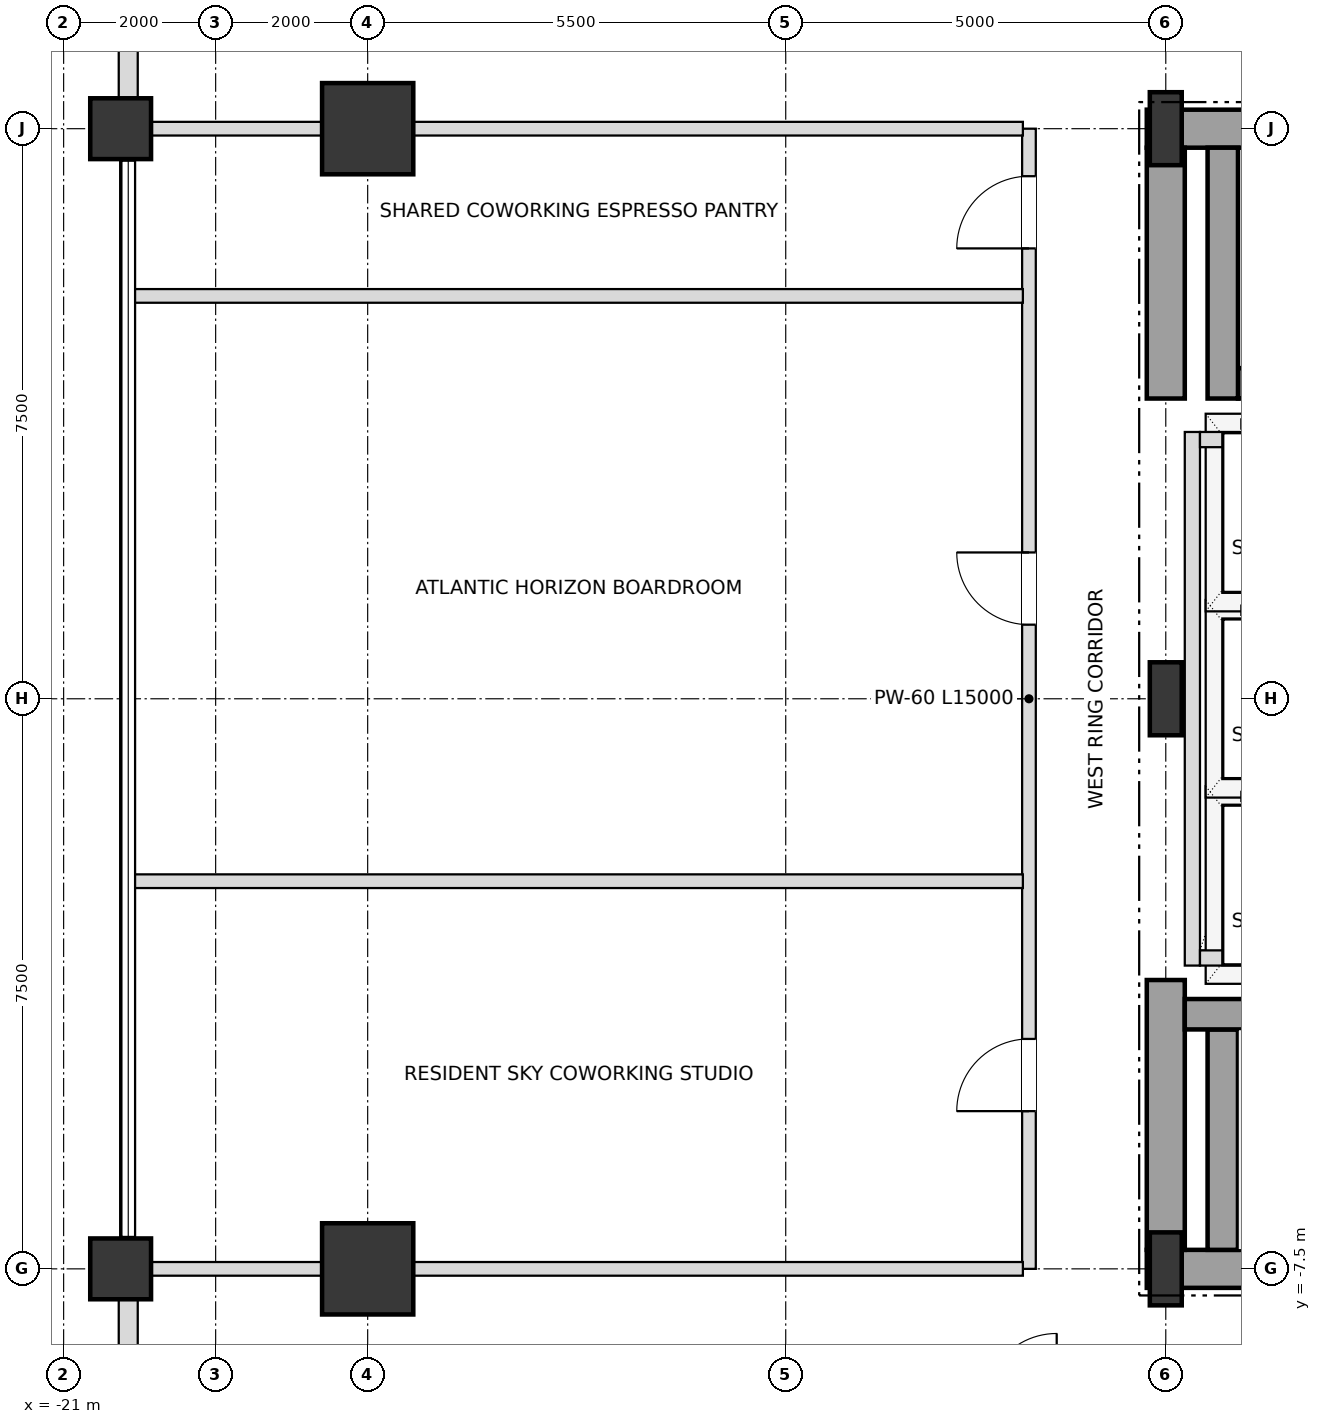
"""IFC4 building model, lengths in metres.
Left out: names, types, materials, properties, quantities, classifications, styles, units other than length and angle.
Written with IfcOpenShell. Run it as: python <this file> out.ifc"""

import sys

from ifc_helpers import new_model, si_unit, direction, frame, frame_2d, origin, origin_2d, place, context, subcontext, project, spatial, rectangle, i_section, extrude, element, fill, save


model = new_model("IFC4")
c1 = context("Model", 3, precision=1e-05, world=origin(), true_north=direction((0.0, 1.0)))
c2 = subcontext(c1, "Body", "Model", "MODEL_VIEW")
j1 = project(units=[si_unit("LENGTHUNIT", "METRE"), si_unit("PLANEANGLEUNIT", "RADIAN")], contexts=[c1])
p1 = place(None, origin())
s1 = spatial("IfcSite", under=j1, at=p1, CompositionType="ELEMENT")
p2 = place(p1, origin())
s2 = spatial("IfcBuilding", under=s1, at=p2, CompositionType="ELEMENT")
p3 = place(p2, frame((0.0, 0.0, 113.4)))
s3 = spatial("IfcBuildingStorey", under=s2, at=p3, CompositionType="ELEMENT", Elevation=113.4)
for number, where, z_axis, x_axis in (
    (1, (-6.5, -7.5, 0.0), (0.0, 0.0, 1.0), (1.0, 0.0, 0.0)),
    (2, (-6.5, 0.0, 0.0), (0.0, 0.0, 1.0), (1.0, 0.0, 0.0)),
    (3, (-6.5, 7.5, 0.0), (0.0, 0.0, 1.0), (1.0, 0.0, 0.0)),
):
    element("IfcColumn", number, at=place(p3, frame(where, z_axis=z_axis, x_axis=x_axis)), inside=s3, PredefinedType="COLUMN", context=c2, shape_type="SweptSolid", body=[
        extrude(i_section(OverallWidth=0.42, OverallDepth=0.96, WebThickness=0.022, FlangeThickness=0.034, at=origin_2d()), origin(), (0.0, 0.0, 1.0), 3.6),
    ])
for number, where, z_axis, x_axis in (
    (4, (-17.0, 7.5, 0.0), (0.0, 0.0, 1.0), (1.0, 0.0, 0.0)),
    (5, (-17.0, -7.5, 0.0), (0.0, 0.0, 1.0), (1.0, 0.0, 0.0)),
):
    element("IfcColumn", number, at=place(p3, frame(where, z_axis=z_axis, x_axis=x_axis)), inside=s3, PredefinedType="USERDEFINED", context=c2, shape_type="SweptSolid", body=[
        extrude(rectangle(XDim=1.2, YDim=1.2, at=origin_2d()), origin(), (0.0, 0.0, 1.0), 3.6),
    ])
for number, where, z_axis, x_axis in (
    (6, (-20.25, -7.5, 0.0), (0.0, 0.0, 1.0), (1.0, 0.0, 0.0)),
    (7, (-20.25, 7.5, 0.0), (0.0, 0.0, 1.0), (1.0, 0.0, 0.0)),
):
    element("IfcColumn", number, at=place(p3, frame(where, z_axis=z_axis, x_axis=x_axis)), inside=s3, PredefinedType="COLUMN", context=c2, shape_type="SweptSolid", body=[
        extrude(rectangle(XDim=0.8, YDim=0.8, at=origin_2d()), origin(), (0.0, 0.0, 1.0), 3.6),
    ])
p4 = place(p3, frame((-20.15, 12.605, 0.0), z_axis=(0.0, 0.0, 1.0), x_axis=(0.0, -1.0, 0.0)))
e8 = element("IfcWall", 8, at=p4, inside=s3, PredefinedType="SOLIDWALL", context=c2, shape_type="SweptSolid", body=[
    extrude(rectangle(XDim=4.71, YDim=0.25, at=frame_2d((2.355, 0.0))), origin(), (0.0, 0.0, 1.0), 2.736),
])
p5 = place(p4, frame((1.455, 0.0, 0.72)))
e9 = element("IfcOpeningElement", 9, at=p5, cuts=e8, PredefinedType="OPENING", context=c2, shape_type="SweptSolid", body=[
    extrude(rectangle(XDim=1.8, YDim=1.68, at=frame_2d((0.9, 0.84))), frame((0.0, 0.135, 0.0), z_axis=(0.0, -1.0, 0.0), x_axis=(1.0, 0.0, 0.0)), (0.0, 0.0, 1.0), 0.27),
])
p6 = place(p3, frame((-20.15, -7.895, 0.0), z_axis=(0.0, 0.0, 1.0), x_axis=(0.0, -1.0, 0.0)))
e10 = element("IfcWall", 10, at=p6, inside=s3, PredefinedType="SOLIDWALL", context=c2, shape_type="SweptSolid", body=[
    extrude(rectangle(XDim=4.71, YDim=0.25, at=frame_2d((2.355, 0.0))), origin(), (0.0, 0.0, 1.0), 2.736),
])
p7 = place(p6, frame((1.455, 0.0, 0.72)))
e11 = element("IfcOpeningElement", 11, at=p7, cuts=e10, PredefinedType="OPENING", context=c2, shape_type="SweptSolid", body=[
    extrude(rectangle(XDim=1.8, YDim=1.68, at=frame_2d((0.9, 0.84))), frame((0.0, 0.135, 0.0), z_axis=(0.0, -1.0, 0.0), x_axis=(1.0, 0.0, 0.0)), (0.0, 0.0, 1.0), 0.27),
])
p8 = place(p3, frame((-6.75, -7.5, 0.0), z_axis=(0.0, 0.0, 1.0), x_axis=(1.0, 0.0, 0.0)))
e12 = element("IfcWall", 12, at=p8, inside=s3, PredefinedType="SHEAR", context=c2, shape_type="SweptSolid", body=[
    extrude(rectangle(XDim=6.75, YDim=0.5, at=frame_2d((3.375, 0.0))), origin(), (0.0, 0.0, 1.0), 3.38),
])
p9 = place(p3, frame((-6.75, 7.5, 0.0), z_axis=(0.0, 0.0, 1.0), x_axis=(1.0, 0.0, 0.0)))
e13 = element("IfcWall", 13, at=p9, inside=s3, PredefinedType="SHEAR", context=c2, shape_type="SweptSolid", body=[
    extrude(rectangle(XDim=6.75, YDim=0.5, at=frame_2d((3.375, 0.0))), origin(), (0.0, 0.0, 1.0), 3.38),
])
p10 = place(p9, frame((1.65, 0.0, 0.0)))
e14 = element("IfcOpeningElement", 14, at=p10, cuts=e13, PredefinedType="OPENING", context=c2, shape_type="SweptSolid", body=[
    extrude(rectangle(XDim=1.05, YDim=2.15, at=frame_2d((0.525, 1.075))), frame((0.0, 0.26, 0.0), z_axis=(0.0, -1.0, 0.0), x_axis=(1.0, 0.0, 0.0)), (0.0, 0.0, 1.0), 0.52),
])
p11 = place(p3, frame((-6.5, -7.25, 0.0), z_axis=(0.0, 0.0, 1.0), x_axis=(0.0, 1.0, 0.0)))
e15 = element("IfcWall", 15, at=p11, inside=s3, PredefinedType="SHEAR", context=c2, shape_type="SweptSolid", body=[
    extrude(rectangle(XDim=3.55, YDim=0.5, at=frame_2d((1.775, 0.0))), origin(), (0.0, 0.0, 1.0), 3.38),
])
p12 = place(p3, frame((-6.5, 3.95, 0.0), z_axis=(0.0, 0.0, 1.0), x_axis=(0.0, 1.0, 0.0)))
e16 = element("IfcWall", 16, at=p12, inside=s3, PredefinedType="SHEAR", context=c2, shape_type="SweptSolid", body=[
    extrude(rectangle(XDim=3.3, YDim=0.5, at=frame_2d((1.65, 0.0))), origin(), (0.0, 0.0, 1.0), 3.38),
])
p13 = place(p3, frame((-5.75, -7.25, 0.0), z_axis=(0.0, 0.0, 1.0), x_axis=(0.0, 1.0, 0.0)))
e17 = element("IfcWall", 17, at=p13, inside=s3, PredefinedType="SHEAR", context=c2, shape_type="SweptSolid", body=[
    extrude(rectangle(XDim=2.9, YDim=0.4, at=frame_2d((1.45, 0.0))), origin(), (0.0, 0.0, 1.0), 3.38),
])
p14 = place(p3, frame((-6.25, -4.15, 0.0), z_axis=(0.0, 0.0, 1.0), x_axis=(1.0, 0.0, 0.0)))
e18 = element("IfcWall", 18, at=p14, inside=s3, PredefinedType="SHEAR", context=c2, shape_type="SweptSolid", body=[
    extrude(rectangle(XDim=7.78, YDim=0.4, at=frame_2d((3.89, 0.0))), origin(), (0.0, 0.0, 1.0), 3.38),
])
p15 = place(p3, frame((-5.55, 4.15, 0.0), z_axis=(0.0, 0.0, 1.0), x_axis=(1.0, 0.0, 0.0)))
e19 = element("IfcWall", 19, at=p15, inside=s3, PredefinedType="SHEAR", context=c2, shape_type="SweptSolid", body=[
    extrude(rectangle(XDim=7.08, YDim=0.4, at=frame_2d((3.54, 0.0))), origin(), (0.0, 0.0, 1.0), 3.38),
])
p16 = place(p3, frame((-5.75, 3.95, 0.0), z_axis=(0.0, 0.0, 1.0), x_axis=(0.0, 1.0, 0.0)))
e20 = element("IfcWall", 20, at=p16, inside=s3, PredefinedType="SHEAR", context=c2, shape_type="SweptSolid", body=[
    extrude(rectangle(XDim=3.3, YDim=0.4, at=frame_2d((1.65, 0.0))), origin(), (0.0, 0.0, 1.0), 3.38),
])
p17 = place(p3, frame((-6.15, -3.51, 0.0), z_axis=(0.0, 0.0, 1.0), x_axis=(0.0, 1.0, 0.0)))
e21 = element("IfcWall", 21, at=p17, inside=s3, PredefinedType="SOLIDWALL", context=c2, shape_type="SweptSolid", body=[
    extrude(rectangle(XDim=7.02, YDim=0.2, at=frame_2d((3.51, 0.0))), origin(), (0.0, 0.0, 1.0), 3.38),
])
for number, where, z_axis, x_axis in (
    (22, (-6.05, -3.41, 0.0), (0.0, 0.0, 1.0), (1.0, 0.0, 0.0)),
    (23, (-6.05, 3.41, 0.0), (0.0, 0.0, 1.0), (1.0, 0.0, 0.0)),
):
    element("IfcWall", number, at=place(p3, frame(where, z_axis=z_axis, x_axis=x_axis)), inside=s3, PredefinedType="SOLIDWALL", context=c2, shape_type="SweptSolid", body=[
        extrude(rectangle(XDim=2.2, YDim=0.2, at=frame_2d((1.1, 0.0))), origin(), (0.0, 0.0, 1.0), 3.38),
    ])
p18 = place(p3, frame((-8.3, -7.5, 0.0), z_axis=(0.0, 0.0, 1.0), x_axis=(0.0, 1.0, 0.0)))
e24 = element("IfcWall", 24, at=p18, inside=s3, PredefinedType="PARTITIONING", context=c2, shape_type="SweptSolid", body=[
    extrude(rectangle(XDim=15.0, YDim=0.18, at=frame_2d((7.5, 0.0))), origin(), (0.0, 0.0, 1.0), 3.38),
])
p19 = place(p18, frame((2.075, 0.0, 0.0)))
e25 = element("IfcOpeningElement", 25, at=p19, cuts=e24, PredefinedType="OPENING", context=c2, shape_type="SweptSolid", body=[
    extrude(rectangle(XDim=0.95, YDim=2.15, at=frame_2d((0.475, 1.075))), frame((0.0, 0.1, 0.0), z_axis=(0.0, -1.0, 0.0), x_axis=(1.0, 0.0, 0.0)), (0.0, 0.0, 1.0), 0.2),
])
p20 = place(p18, frame((8.475, 0.0, 0.0)))
e26 = element("IfcOpeningElement", 26, at=p20, cuts=e24, PredefinedType="OPENING", context=c2, shape_type="SweptSolid", body=[
    extrude(rectangle(XDim=0.95, YDim=2.15, at=frame_2d((0.475, 1.075))), frame((0.0, 0.1, 0.0), z_axis=(0.0, -1.0, 0.0), x_axis=(1.0, 0.0, 0.0)), (0.0, 0.0, 1.0), 0.2),
])
p21 = place(p18, frame((13.425, 0.0, 0.0)))
e27 = element("IfcOpeningElement", 27, at=p21, cuts=e24, PredefinedType="OPENING", context=c2, shape_type="SweptSolid", body=[
    extrude(rectangle(XDim=0.95, YDim=2.15, at=frame_2d((0.475, 1.075))), frame((0.0, 0.1, 0.0), z_axis=(0.0, -1.0, 0.0), x_axis=(1.0, 0.0, 0.0)), (0.0, 0.0, 1.0), 0.2),
])
p22 = place(p3, frame((-20.15, -7.5, 0.0), z_axis=(0.0, 0.0, 1.0), x_axis=(1.0, 0.0, 0.0)))
e28 = element("IfcWall", 28, at=p22, inside=s3, PredefinedType="PARTITIONING", context=c2, shape_type="SweptSolid", body=[
    extrude(rectangle(XDim=11.77, YDim=0.18, at=frame_2d((5.885, 0.0))), origin(), (0.0, 0.0, 1.0), 2.816),
])
for number, where, z_axis, x_axis in (
    (29, (-20.07, -2.4, 0.0), (0.0, 0.0, 1.0), (1.0, 0.0, 0.0)),
    (30, (-20.07, 5.3, 0.0), (0.0, 0.0, 1.0), (1.0, 0.0, 0.0)),
):
    element("IfcWall", number, at=place(p3, frame(where, z_axis=z_axis, x_axis=x_axis)), inside=s3, PredefinedType="PARTITIONING", context=c2, shape_type="SweptSolid", body=[
        extrude(rectangle(XDim=11.69, YDim=0.18, at=frame_2d((5.845, 0.0))), origin(), (0.0, 0.0, 1.0), 2.816),
    ])
p23 = place(p3, frame((-20.15, 7.5, 0.0), z_axis=(0.0, 0.0, 1.0), x_axis=(1.0, 0.0, 0.0)))
e31 = element("IfcWall", 31, at=p23, inside=s3, PredefinedType="PARTITIONING", context=c2, shape_type="SweptSolid", body=[
    extrude(rectangle(XDim=11.77, YDim=0.18, at=frame_2d((5.885, 0.0))), origin(), (0.0, 0.0, 1.0), 2.816),
])
p24 = place(p19, origin())
e32 = element("IfcDoor", 32, at=p24, inside=s3, OperationType="SINGLE_SWING_LEFT", PredefinedType="DOOR", context=c2, shape_type="SweptSolid", body=[
    extrude(rectangle(XDim=0.95, YDim=2.15, at=frame_2d((0.475, 1.075))), frame((0.0, 0.025, 0.0), z_axis=(0.0, -1.0, 0.0), x_axis=(1.0, 0.0, 0.0)), (0.0, 0.0, 1.0), 0.05),
])
fill(e25, e32)
p25 = place(p20, origin())
e33 = element("IfcDoor", 33, at=p25, inside=s3, OperationType="SINGLE_SWING_RIGHT", PredefinedType="DOOR", context=c2, shape_type="SweptSolid", body=[
    extrude(rectangle(XDim=0.95, YDim=2.15, at=frame_2d((0.475, 1.075))), frame((0.0, 0.025, 0.0), z_axis=(0.0, -1.0, 0.0), x_axis=(1.0, 0.0, 0.0)), (0.0, 0.0, 1.0), 0.05),
])
fill(e26, e33)
p26 = place(p21, origin())
e34 = element("IfcDoor", 34, at=p26, inside=s3, OperationType="SINGLE_SWING_LEFT", PredefinedType="DOOR", context=c2, shape_type="SweptSolid", body=[
    extrude(rectangle(XDim=0.95, YDim=2.15, at=frame_2d((0.475, 1.075))), frame((0.0, 0.025, 0.0), z_axis=(0.0, -1.0, 0.0), x_axis=(1.0, 0.0, 0.0)), (0.0, 0.0, 1.0), 0.05),
])
fill(e27, e34)
save(model, sys.argv[1])
